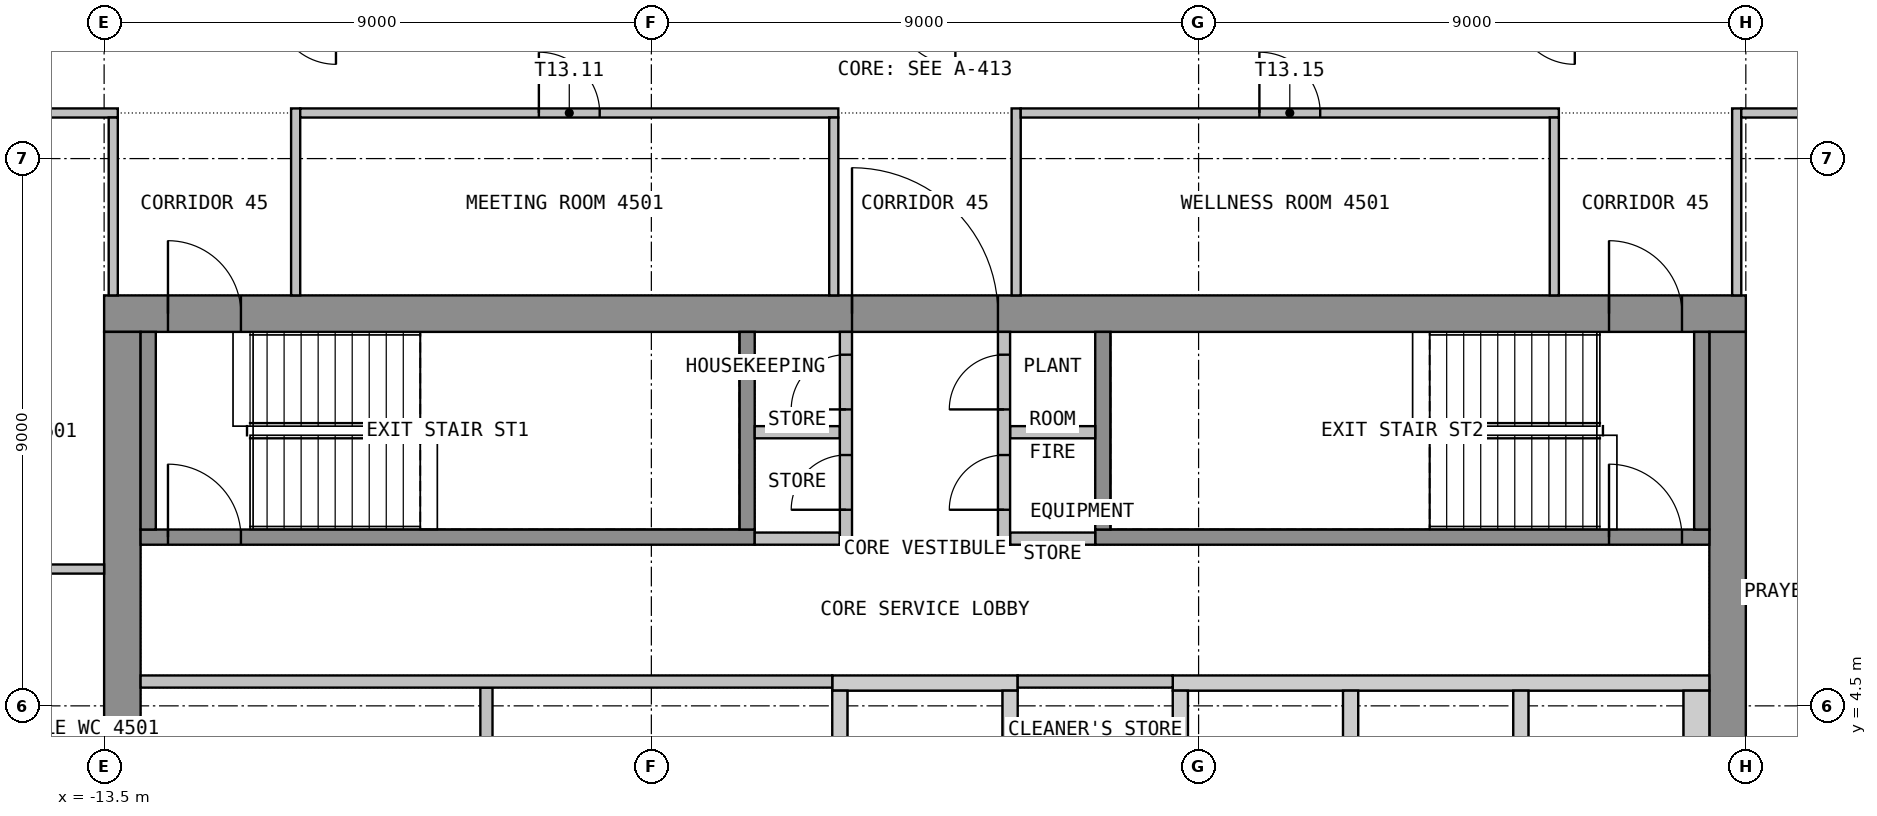
"""IFC4 building model, lengths in metres.
Left out: names, types, materials, properties, quantities, classifications, styles, units other than length and angle.
Written with IfcOpenShell. Run it as: python <this file> out.ifc"""

import sys

from ifc_helpers import new_model, si_unit, direction, frame, frame_2d, origin, place, context, subcontext, project, spatial, polyline, rectangle, outline, extrude, element, fill, save


model = new_model("IFC4")
c1 = context("Model", 3, precision=1e-05, world=origin(), true_north=direction((0.0, 1.0)))
c2 = subcontext(c1, "Body", "Model", "MODEL_VIEW")
j1 = project(units=[si_unit("LENGTHUNIT", "METRE"), si_unit("PLANEANGLEUNIT", "RADIAN")], contexts=[c1])
p1 = place(None, origin())
s1 = spatial("IfcSite", under=j1, at=p1, CompositionType="ELEMENT")
p2 = place(p1, origin())
s2 = spatial("IfcBuilding", under=s1, at=p2, CompositionType="ELEMENT")
p3 = place(p2, frame((0.0, 0.0, 183.9)))
s3 = spatial("IfcBuildingStorey", under=s2, at=p3, CompositionType="ELEMENT", Elevation=183.9)
p4 = place(p3, frame((-13.5, 10.95, 0.0), z_axis=(0.0, 0.0, 1.0), x_axis=(1.0, 0.0, 0.0)))
e1 = element("IfcWall", 1, at=p4, inside=s3, PredefinedType="SHEAR", context=c2, shape_type="SweptSolid", body=[
    extrude(rectangle(XDim=27.0, YDim=0.6, at=frame_2d((13.5, 0.0))), origin(), (0.0, 0.0, 1.0), 3.55),
])
p5 = place(p4, frame((12.3, 0.0, 0.0)))
e2 = element("IfcOpeningElement", 2, at=p5, cuts=e1, PredefinedType="OPENING", context=c2, shape_type="SweptSolid", body=[
    extrude(rectangle(XDim=2.4, YDim=2.1, at=frame_2d((1.2, 1.05))), frame((0.0, 0.31, 0.0), z_axis=(0.0, -1.0, 0.0), x_axis=(1.0, 0.0, 0.0)), (0.0, 0.0, 1.0), 0.62),
])
p6 = place(p4, frame((1.05, 0.0, 0.0)))
e3 = element("IfcOpeningElement", 3, at=p6, cuts=e1, PredefinedType="OPENING", context=c2, shape_type="SweptSolid", body=[
    extrude(rectangle(XDim=1.2, YDim=2.1, at=frame_2d((0.6, 1.05))), frame((0.0, 0.31, 0.0), z_axis=(0.0, -1.0, 0.0), x_axis=(1.0, 0.0, 0.0)), (0.0, 0.0, 1.0), 0.62),
])
p7 = place(p4, frame((24.75, 0.0, 0.0)))
e4 = element("IfcOpeningElement", 4, at=p7, cuts=e1, PredefinedType="OPENING", context=c2, shape_type="SweptSolid", body=[
    extrude(rectangle(XDim=1.2, YDim=2.1, at=frame_2d((0.6, 1.05))), frame((0.0, 0.31, 0.0), z_axis=(0.0, -1.0, 0.0), x_axis=(1.0, 0.0, 0.0)), (0.0, 0.0, 1.0), 0.62),
])
p8 = place(p3, frame((-13.2, -10.65, 0.0), z_axis=(0.0, 0.0, 1.0), x_axis=(0.0, 1.0, 0.0)))
e5 = element("IfcWall", 5, at=p8, inside=s3, PredefinedType="SHEAR", context=c2, shape_type="SweptSolid", body=[
    extrude(rectangle(XDim=21.3, YDim=0.6, at=frame_2d((10.65, 0.0))), origin(), (0.0, 0.0, 1.0), 3.55),
])
p9 = place(p8, frame((9.45, 0.0, 0.0)))
e6 = element("IfcOpeningElement", 6, at=p9, cuts=e5, PredefinedType="OPENING", context=c2, shape_type="SweptSolid", body=[
    extrude(rectangle(XDim=2.4, YDim=2.1, at=frame_2d((1.2, 1.05))), frame((0.0, 0.31, 0.0), z_axis=(0.0, -1.0, 0.0), x_axis=(1.0, 0.0, 0.0)), (0.0, 0.0, 1.0), 0.62),
])
p10 = place(p3, frame((13.2, -10.65, 0.0), z_axis=(0.0, 0.0, 1.0), x_axis=(0.0, 1.0, 0.0)))
e7 = element("IfcWall", 7, at=p10, inside=s3, PredefinedType="SHEAR", context=c2, shape_type="SweptSolid", body=[
    extrude(rectangle(XDim=21.3, YDim=0.6, at=frame_2d((10.65, 0.0))), origin(), (0.0, 0.0, 1.0), 3.55),
])
p11 = place(p10, frame((9.45, 0.0, 0.0)))
e8 = element("IfcOpeningElement", 8, at=p11, cuts=e7, PredefinedType="OPENING", context=c2, shape_type="SweptSolid", body=[
    extrude(rectangle(XDim=2.4, YDim=2.1, at=frame_2d((1.2, 1.05))), frame((0.0, 0.31, 0.0), z_axis=(0.0, -1.0, 0.0), x_axis=(1.0, 0.0, 0.0)), (0.0, 0.0, 1.0), 0.62),
])
p12 = place(p3, origin())
e9 = element("IfcWall", 9, at=p12, inside=s3, PredefinedType="SHEAR", context=c2, shape_type="SweptSolid", body=[
    extrude(outline(polyline([(-1.525, 4.75), (1.525, 4.75), (1.525, 5.0), (-1.525, 5.0), (-1.525, 4.75)])), origin(), (0.0, 0.0, 1.0), 3.55),
])
p13 = place(p3, origin())
e10 = element("IfcWall", 10, at=p13, inside=s3, PredefinedType="SHEAR", context=c2, shape_type="SweptSolid", body=[
    extrude(outline(polyline([(4.075, 4.75), (12.9, 4.75), (12.9, 5.0), (4.075, 5.0), (4.075, 4.75)])), origin(), (0.0, 0.0, 1.0), 3.55),
])
p14 = place(p3, origin())
e11 = element("IfcWall", 11, at=p14, inside=s3, PredefinedType="SHEAR", context=c2, shape_type="SweptSolid", body=[
    extrude(outline(polyline([(-1.525, 2.05), (-1.275, 2.05), (-1.275, 4.75), (-1.525, 4.75), (-1.525, 2.05)])), origin(), (0.0, 0.0, 1.0), 3.55),
])
p15 = place(p3, origin())
e12 = element("IfcWall", 12, at=p15, inside=s3, PredefinedType="SHEAR", context=c2, shape_type="SweptSolid", body=[
    extrude(outline(polyline([(1.275, 2.05), (1.525, 2.05), (1.525, 4.75), (1.275, 4.75), (1.275, 2.05)])), origin(), (0.0, 0.0, 1.0), 3.55),
])
p16 = place(p3, origin())
e13 = element("IfcWall", 13, at=p16, inside=s3, PredefinedType="SHEAR", context=c2, shape_type="SweptSolid", body=[
    extrude(outline(polyline([(9.675, 2.05), (9.925, 2.05), (9.925, 4.75), (9.675, 4.75), (9.675, 2.05)])), origin(), (0.0, 0.0, 1.0), 3.55),
])
p17 = place(p3, origin())
e14 = element("IfcWall", 14, at=p17, inside=s3, PredefinedType="SHEAR", context=c2, shape_type="SweptSolid", body=[
    extrude(outline(polyline([(12.475, 2.05), (12.9, 2.05), (12.9, 4.75), (12.475, 4.75), (12.475, 2.05)])), origin(), (0.0, 0.0, 1.0), 3.55),
])
p18 = place(p3, origin())
e15 = element("IfcWall", 15, at=p18, inside=s3, PredefinedType="SHEAR", context=c2, shape_type="SweptSolid", body=[
    extrude(outline(polyline([(4.075, 3.05), (4.325, 3.05), (4.325, 4.75), (4.075, 4.75), (4.075, 3.05)])), origin(), (0.0, 0.0, 1.0), 3.55),
])
p19 = place(p3, origin())
e16 = element("IfcWall", 16, at=p19, inside=s3, PredefinedType="SHEAR", context=c2, shape_type="SweptSolid", body=[
    extrude(outline(polyline([(6.875, 3.05), (7.125, 3.05), (7.125, 4.75), (6.875, 4.75), (6.875, 3.05)])), origin(), (0.0, 0.0, 1.0), 3.55),
])
p20 = place(p3, frame((-12.9, 7.275, 0.0), z_axis=(0.0, 0.0, 1.0), x_axis=(1.0, 0.0, 0.0)))
e17 = element("IfcWall", 17, at=p20, inside=s3, PredefinedType="SHEAR", context=c2, shape_type="SweptSolid", body=[
    extrude(rectangle(XDim=10.1, YDim=0.25, at=frame_2d((5.05, 0.0))), origin(), (0.0, 0.0, 1.0), 3.55),
])
p21 = place(p20, frame((0.45, 0.0, 0.0)))
e18 = element("IfcOpeningElement", 18, at=p21, cuts=e17, PredefinedType="OPENING", context=c2, shape_type="SweptSolid", body=[
    extrude(rectangle(XDim=1.2, YDim=2.1, at=frame_2d((0.6, 1.05))), frame((0.0, 0.135, 0.0), z_axis=(0.0, -1.0, 0.0), x_axis=(1.0, 0.0, 0.0)), (0.0, 0.0, 1.0), 0.27),
])
for number, where, z_axis, x_axis in (
    (19, (-12.775, 7.4, 0.0), (0.0, 0.0, 1.0), (0.0, 1.0, 0.0)),
    (20, (-2.925, 7.4, 0.0), (0.0, 0.0, 1.0), (0.0, 1.0, 0.0)),
):
    element("IfcWall", number, at=place(p3, frame(where, z_axis=z_axis, x_axis=x_axis)), inside=s3, PredefinedType="SHEAR", context=c2, shape_type="SweptSolid", body=[
        extrude(rectangle(XDim=3.25, YDim=0.25, at=frame_2d((1.625, 0.0))), origin(), (0.0, 0.0, 1.0), 3.55),
    ])
p22 = place(p3, frame((2.8, 7.275, 0.0), z_axis=(0.0, 0.0, 1.0), x_axis=(1.0, 0.0, 0.0)))
e21 = element("IfcWall", 21, at=p22, inside=s3, PredefinedType="SHEAR", context=c2, shape_type="SweptSolid", body=[
    extrude(rectangle(XDim=10.1, YDim=0.25, at=frame_2d((5.05, 0.0))), origin(), (0.0, 0.0, 1.0), 3.55),
])
p23 = place(p22, frame((8.45, 0.0, 0.0)))
e22 = element("IfcOpeningElement", 22, at=p23, cuts=e21, PredefinedType="OPENING", context=c2, shape_type="SweptSolid", body=[
    extrude(rectangle(XDim=1.2, YDim=2.1, at=frame_2d((0.6, 1.05))), frame((0.0, 0.135, 0.0), z_axis=(0.0, -1.0, 0.0), x_axis=(1.0, 0.0, 0.0)), (0.0, 0.0, 1.0), 0.27),
])
for number, where, z_axis, x_axis in (
    (23, (2.925, 7.4, 0.0), (0.0, 0.0, 1.0), (0.0, 1.0, 0.0)),
    (24, (12.775, 7.4, 0.0), (0.0, 0.0, 1.0), (0.0, 1.0, 0.0)),
):
    element("IfcWall", number, at=place(p3, frame(where, z_axis=z_axis, x_axis=x_axis)), inside=s3, PredefinedType="SHEAR", context=c2, shape_type="SweptSolid", body=[
        extrude(rectangle(XDim=3.25, YDim=0.25, at=frame_2d((1.625, 0.0))), origin(), (0.0, 0.0, 1.0), 3.55),
    ])
for number, where, z_axis, x_axis in (
    (25, (-2.8, 7.25, 0.0), (0.0, 0.0, 1.0), (1.0, 0.0, 0.0)),
    (26, (-2.8, 9.0, 0.0), (0.0, 0.0, 1.0), (1.0, 0.0, 0.0)),
    (27, (1.4, 7.25, 0.0), (0.0, 0.0, 1.0), (1.0, 0.0, 0.0)),
    (28, (1.4, 9.0, 0.0), (0.0, 0.0, 1.0), (1.0, 0.0, 0.0)),
):
    element("IfcWall", number, at=place(p3, frame(where, z_axis=z_axis, x_axis=x_axis)), inside=s3, PredefinedType="PARTITIONING", context=c2, shape_type="SweptSolid", body=[
        extrude(rectangle(XDim=1.4, YDim=0.2, at=frame_2d((0.7, 0.0))), origin(), (0.0, 0.0, 1.0), 3.55),
    ])
p24 = place(p3, frame((-1.3, 7.15, 0.0), z_axis=(0.0, 0.0, 1.0), x_axis=(0.0, 1.0, 0.0)))
e29 = element("IfcWall", 29, at=p24, inside=s3, PredefinedType="PARTITIONING", context=c2, shape_type="SweptSolid", body=[
    extrude(rectangle(XDim=3.5, YDim=0.2, at=frame_2d((1.75, 0.0))), origin(), (0.0, 0.0, 1.0), 3.55),
])
p25 = place(p24, frame((0.575, 0.0, 0.0)))
e30 = element("IfcOpeningElement", 30, at=p25, cuts=e29, PredefinedType="OPENING", context=c2, shape_type="SweptSolid", body=[
    extrude(rectangle(XDim=0.9, YDim=2.1, at=frame_2d((0.45, 1.05))), frame((0.0, 0.11, 0.0), z_axis=(0.0, -1.0, 0.0), x_axis=(1.0, 0.0, 0.0)), (0.0, 0.0, 1.0), 0.22),
])
p26 = place(p24, frame((2.225, 0.0, 0.0)))
e31 = element("IfcOpeningElement", 31, at=p26, cuts=e29, PredefinedType="OPENING", context=c2, shape_type="SweptSolid", body=[
    extrude(rectangle(XDim=0.9, YDim=2.1, at=frame_2d((0.45, 1.05))), frame((0.0, 0.11, 0.0), z_axis=(0.0, -1.0, 0.0), x_axis=(1.0, 0.0, 0.0)), (0.0, 0.0, 1.0), 0.22),
])
p27 = place(p3, frame((1.3, 7.15, 0.0), z_axis=(0.0, 0.0, 1.0), x_axis=(0.0, 1.0, 0.0)))
e32 = element("IfcWall", 32, at=p27, inside=s3, PredefinedType="PARTITIONING", context=c2, shape_type="SweptSolid", body=[
    extrude(rectangle(XDim=3.5, YDim=0.2, at=frame_2d((1.75, 0.0))), origin(), (0.0, 0.0, 1.0), 3.55),
])
p28 = place(p27, frame((0.575, 0.0, 0.0)))
e33 = element("IfcOpeningElement", 33, at=p28, cuts=e32, PredefinedType="OPENING", context=c2, shape_type="SweptSolid", body=[
    extrude(rectangle(XDim=0.9, YDim=2.1, at=frame_2d((0.45, 1.05))), frame((0.0, 0.11, 0.0), z_axis=(0.0, -1.0, 0.0), x_axis=(1.0, 0.0, 0.0)), (0.0, 0.0, 1.0), 0.22),
])
p29 = place(p27, frame((2.225, 0.0, 0.0)))
e34 = element("IfcOpeningElement", 34, at=p29, cuts=e32, PredefinedType="OPENING", context=c2, shape_type="SweptSolid", body=[
    extrude(rectangle(XDim=0.9, YDim=2.1, at=frame_2d((0.45, 1.05))), frame((0.0, 0.11, 0.0), z_axis=(0.0, -1.0, 0.0), x_axis=(1.0, 0.0, 0.0)), (0.0, 0.0, 1.0), 0.22),
])
p30 = place(p3, frame((-7.212, 2.0, 0.0), z_axis=(0.0, 0.0, 1.0), x_axis=(0.0, 1.0, 0.0)))
e35 = element("IfcWall", 35, at=p30, inside=s3, PredefinedType="PARTITIONING", context=c2, shape_type="SweptSolid", body=[
    extrude(rectangle(XDim=2.8, YDim=0.2, at=frame_2d((1.4, 0.0))), origin(), (0.0, 0.0, 1.0), 3.55),
])
p31 = place(p3, frame((-12.9, 4.9, 0.0), z_axis=(0.0, 0.0, 1.0), x_axis=(1.0, 0.0, 0.0)))
e36 = element("IfcWall", 36, at=p31, inside=s3, PredefinedType="PARTITIONING", context=c2, shape_type="SweptSolid", body=[
    extrude(rectangle(XDim=11.375, YDim=0.2, at=frame_2d((5.688, 0.0))), origin(), (0.0, 0.0, 1.0), 3.55),
])
p32 = place(p3, frame((1.525, 4.9, 0.0), z_axis=(0.0, 0.0, 1.0), x_axis=(1.0, 0.0, 0.0)))
e37 = element("IfcWall", 37, at=p32, inside=s3, PredefinedType="PARTITIONING", context=c2, shape_type="SweptSolid", body=[
    extrude(rectangle(XDim=2.55, YDim=0.2, at=frame_2d((1.275, 0.0))), origin(), (0.0, 0.0, 1.0), 3.55),
])
p33 = place(p3, frame((-16.425, 6.75, 0.0), z_axis=(0.0, 0.0, 1.0), x_axis=(1.0, 0.0, 0.0)))
e38 = element("IfcWall", 38, at=p33, inside=s3, PredefinedType="PARTITIONING", context=c2, shape_type="SweptSolid", body=[
    extrude(rectangle(XDim=2.925, YDim=0.15, at=frame_2d((1.462, 0.0))), origin(), (0.0, 0.0, 1.0), 3.55),
])
p34 = place(p3, frame((-16.425, 14.25, 0.0), z_axis=(0.0, 0.0, 1.0), x_axis=(1.0, 0.0, 0.0)))
e39 = element("IfcWall", 39, at=p34, inside=s3, PredefinedType="PARTITIONING", context=c2, shape_type="SweptSolid", body=[
    extrude(rectangle(XDim=3.15, YDim=0.15, at=frame_2d((1.575, 0.0))), origin(), (0.0, 0.0, 1.0), 3.55),
])
p35 = place(p3, frame((-13.35, 14.175, 0.0), z_axis=(0.0, 0.0, 1.0), x_axis=(0.0, -1.0, 0.0)))
e40 = element("IfcWall", 40, at=p35, inside=s3, PredefinedType="PARTITIONING", context=c2, shape_type="SweptSolid", body=[
    extrude(rectangle(XDim=2.925, YDim=0.15, at=frame_2d((1.462, 0.0))), origin(), (0.0, 0.0, 1.0), 3.55),
])
p36 = place(p3, frame((-10.35, 11.25, 0.0), z_axis=(0.0, 0.0, 1.0), x_axis=(0.0, 1.0, 0.0)))
e41 = element("IfcWall", 41, at=p36, inside=s3, PredefinedType="PARTITIONING", context=c2, shape_type="SweptSolid", body=[
    extrude(rectangle(XDim=3.075, YDim=0.15, at=frame_2d((1.538, 0.0))), origin(), (0.0, 0.0, 1.0), 3.55),
])
p37 = place(p3, frame((-10.275, 14.25, 0.0), z_axis=(0.0, 0.0, 1.0), x_axis=(1.0, 0.0, 0.0)))
e42 = element("IfcWall", 42, at=p37, inside=s3, PredefinedType="PARTITIONING", context=c2, shape_type="SweptSolid", body=[
    extrude(rectangle(XDim=8.85, YDim=0.15, at=frame_2d((4.425, 0.0))), origin(), (0.0, 0.0, 1.0), 3.55),
])
p38 = place(p37, frame((3.925, 0.0, 0.0)))
e43 = element("IfcOpeningElement", 43, at=p38, cuts=e42, PredefinedType="OPENING", context=c2, shape_type="SweptSolid", body=[
    extrude(rectangle(XDim=1.0, YDim=2.1, at=frame_2d((0.5, 1.05))), frame((0.0, 0.085, 0.0), z_axis=(0.0, -1.0, 0.0), x_axis=(1.0, 0.0, 0.0)), (0.0, 0.0, 1.0), 0.17),
])
p39 = place(p3, frame((-1.5, 14.175, 0.0), z_axis=(0.0, 0.0, 1.0), x_axis=(0.0, -1.0, 0.0)))
e44 = element("IfcWall", 44, at=p39, inside=s3, PredefinedType="PARTITIONING", context=c2, shape_type="SweptSolid", body=[
    extrude(rectangle(XDim=2.925, YDim=0.15, at=frame_2d((1.462, 0.0))), origin(), (0.0, 0.0, 1.0), 3.55),
])
p40 = place(p3, frame((1.5, 11.25, 0.0), z_axis=(0.0, 0.0, 1.0), x_axis=(0.0, 1.0, 0.0)))
e45 = element("IfcWall", 45, at=p40, inside=s3, PredefinedType="PARTITIONING", context=c2, shape_type="SweptSolid", body=[
    extrude(rectangle(XDim=3.075, YDim=0.15, at=frame_2d((1.538, 0.0))), origin(), (0.0, 0.0, 1.0), 3.55),
])
p41 = place(p3, frame((1.575, 14.25, 0.0), z_axis=(0.0, 0.0, 1.0), x_axis=(1.0, 0.0, 0.0)))
e46 = element("IfcWall", 46, at=p41, inside=s3, PredefinedType="PARTITIONING", context=c2, shape_type="SweptSolid", body=[
    extrude(rectangle(XDim=8.85, YDim=0.15, at=frame_2d((4.425, 0.0))), origin(), (0.0, 0.0, 1.0), 3.55),
])
p42 = place(p41, frame((3.925, 0.0, 0.0)))
e47 = element("IfcOpeningElement", 47, at=p42, cuts=e46, PredefinedType="OPENING", context=c2, shape_type="SweptSolid", body=[
    extrude(rectangle(XDim=1.0, YDim=2.1, at=frame_2d((0.5, 1.05))), frame((0.0, 0.085, 0.0), z_axis=(0.0, -1.0, 0.0), x_axis=(1.0, 0.0, 0.0)), (0.0, 0.0, 1.0), 0.17),
])
p43 = place(p3, frame((10.35, 14.175, 0.0), z_axis=(0.0, 0.0, 1.0), x_axis=(0.0, -1.0, 0.0)))
e48 = element("IfcWall", 48, at=p43, inside=s3, PredefinedType="PARTITIONING", context=c2, shape_type="SweptSolid", body=[
    extrude(rectangle(XDim=2.925, YDim=0.15, at=frame_2d((1.462, 0.0))), origin(), (0.0, 0.0, 1.0), 3.55),
])
p44 = place(p3, frame((13.35, 11.25, 0.0), z_axis=(0.0, 0.0, 1.0), x_axis=(0.0, 1.0, 0.0)))
e49 = element("IfcWall", 49, at=p44, inside=s3, PredefinedType="PARTITIONING", context=c2, shape_type="SweptSolid", body=[
    extrude(rectangle(XDim=3.075, YDim=0.15, at=frame_2d((1.538, 0.0))), origin(), (0.0, 0.0, 1.0), 3.55),
])
p45 = place(p3, frame((13.425, 14.25, 0.0), z_axis=(0.0, 0.0, 1.0), x_axis=(1.0, 0.0, 0.0)))
e50 = element("IfcWall", 50, at=p45, inside=s3, PredefinedType="PARTITIONING", context=c2, shape_type="SweptSolid", body=[
    extrude(rectangle(XDim=3.15, YDim=0.15, at=frame_2d((1.575, 0.0))), origin(), (0.0, 0.0, 1.0), 3.55),
])
p46 = place(p5, origin())
e51 = element("IfcDoor", 51, at=p46, inside=s3, OperationType="DOUBLE_DOOR_DOUBLE_SWING", PredefinedType="DOOR", context=c2, shape_type="SweptSolid", body=[
    extrude(rectangle(XDim=2.4, YDim=2.1, at=frame_2d((1.2, 1.05))), frame((0.0, 0.025, 0.0), z_axis=(0.0, -1.0, 0.0), x_axis=(1.0, 0.0, 0.0)), (0.0, 0.0, 1.0), 0.05),
])
fill(e2, e51)
p47 = place(p6, origin())
e52 = element("IfcDoor", 52, at=p47, inside=s3, OperationType="SINGLE_SWING_RIGHT", PredefinedType="DOOR", context=c2, shape_type="SweptSolid", body=[
    extrude(rectangle(XDim=1.2, YDim=2.1, at=frame_2d((0.6, 1.05))), frame((0.0, 0.025, 0.0), z_axis=(0.0, -1.0, 0.0), x_axis=(1.0, 0.0, 0.0)), (0.0, 0.0, 1.0), 0.05),
])
fill(e3, e52)
p48 = place(p7, origin())
e53 = element("IfcDoor", 53, at=p48, inside=s3, OperationType="SINGLE_SWING_RIGHT", PredefinedType="DOOR", context=c2, shape_type="SweptSolid", body=[
    extrude(rectangle(XDim=1.2, YDim=2.1, at=frame_2d((0.6, 1.05))), frame((0.0, 0.025, 0.0), z_axis=(0.0, -1.0, 0.0), x_axis=(1.0, 0.0, 0.0)), (0.0, 0.0, 1.0), 0.05),
])
fill(e4, e53)
p49 = place(p21, origin())
e54 = element("IfcDoor", 54, at=p49, inside=s3, OperationType="SINGLE_SWING_LEFT", PredefinedType="DOOR", context=c2, shape_type="SweptSolid", body=[
    extrude(rectangle(XDim=1.2, YDim=2.1, at=frame_2d((0.6, 1.05))), frame((0.0, 0.025, 0.0), z_axis=(0.0, -1.0, 0.0), x_axis=(1.0, 0.0, 0.0)), (0.0, 0.0, 1.0), 0.05),
])
fill(e18, e54)
p50 = place(p23, origin())
e55 = element("IfcDoor", 55, at=p50, inside=s3, OperationType="SINGLE_SWING_LEFT", PredefinedType="DOOR", context=c2, shape_type="SweptSolid", body=[
    extrude(rectangle(XDim=1.2, YDim=2.1, at=frame_2d((0.6, 1.05))), frame((0.0, 0.025, 0.0), z_axis=(0.0, -1.0, 0.0), x_axis=(1.0, 0.0, 0.0)), (0.0, 0.0, 1.0), 0.05),
])
fill(e22, e55)
p51 = place(p25, origin())
e56 = element("IfcDoor", 56, at=p51, inside=s3, OperationType="SINGLE_SWING_LEFT", PredefinedType="DOOR", context=c2, shape_type="SweptSolid", body=[
    extrude(rectangle(XDim=0.9, YDim=2.1, at=frame_2d((0.45, 1.05))), frame((0.0, 0.025, 0.0), z_axis=(0.0, -1.0, 0.0), x_axis=(1.0, 0.0, 0.0)), (0.0, 0.0, 1.0), 0.05),
])
fill(e30, e56)
p52 = place(p26, origin())
e57 = element("IfcDoor", 57, at=p52, inside=s3, OperationType="SINGLE_SWING_LEFT", PredefinedType="DOOR", context=c2, shape_type="SweptSolid", body=[
    extrude(rectangle(XDim=0.9, YDim=2.1, at=frame_2d((0.45, 1.05))), frame((0.0, 0.025, 0.0), z_axis=(0.0, -1.0, 0.0), x_axis=(1.0, 0.0, 0.0)), (0.0, 0.0, 1.0), 0.05),
])
fill(e31, e57)
p53 = place(p28, origin())
e58 = element("IfcDoor", 58, at=p53, inside=s3, OperationType="SINGLE_SWING_LEFT", PredefinedType="DOOR", context=c2, shape_type="SweptSolid", body=[
    extrude(rectangle(XDim=0.9, YDim=2.1, at=frame_2d((0.45, 1.05))), frame((0.0, 0.025, 0.0), z_axis=(0.0, -1.0, 0.0), x_axis=(1.0, 0.0, 0.0)), (0.0, 0.0, 1.0), 0.05),
])
fill(e33, e58)
p54 = place(p29, origin())
e59 = element("IfcDoor", 59, at=p54, inside=s3, OperationType="SINGLE_SWING_LEFT", PredefinedType="DOOR", context=c2, shape_type="SweptSolid", body=[
    extrude(rectangle(XDim=0.9, YDim=2.1, at=frame_2d((0.45, 1.05))), frame((0.0, 0.025, 0.0), z_axis=(0.0, -1.0, 0.0), x_axis=(1.0, 0.0, 0.0)), (0.0, 0.0, 1.0), 0.05),
])
fill(e34, e59)
p55 = place(p38, origin())
e60 = element("IfcDoor", 60, at=p55, inside=s3, OperationType="SINGLE_SWING_LEFT", PredefinedType="DOOR", context=c2, shape_type="SweptSolid", body=[
    extrude(rectangle(XDim=1.0, YDim=2.1, at=frame_2d((0.5, 1.05))), frame((0.0, 0.025, 0.0), z_axis=(0.0, -1.0, 0.0), x_axis=(1.0, 0.0, 0.0)), (0.0, 0.0, 1.0), 0.05),
])
fill(e43, e60)
p56 = place(p42, origin())
e61 = element("IfcDoor", 61, at=p56, inside=s3, OperationType="SINGLE_SWING_RIGHT", PredefinedType="DOOR", context=c2, shape_type="SweptSolid", body=[
    extrude(rectangle(XDim=1.0, YDim=2.1, at=frame_2d((0.5, 1.05))), frame((0.0, 0.025, 0.0), z_axis=(0.0, -1.0, 0.0), x_axis=(1.0, 0.0, 0.0)), (0.0, 0.0, 1.0), 0.05),
])
fill(e47, e61)
save(model, sys.argv[1])
